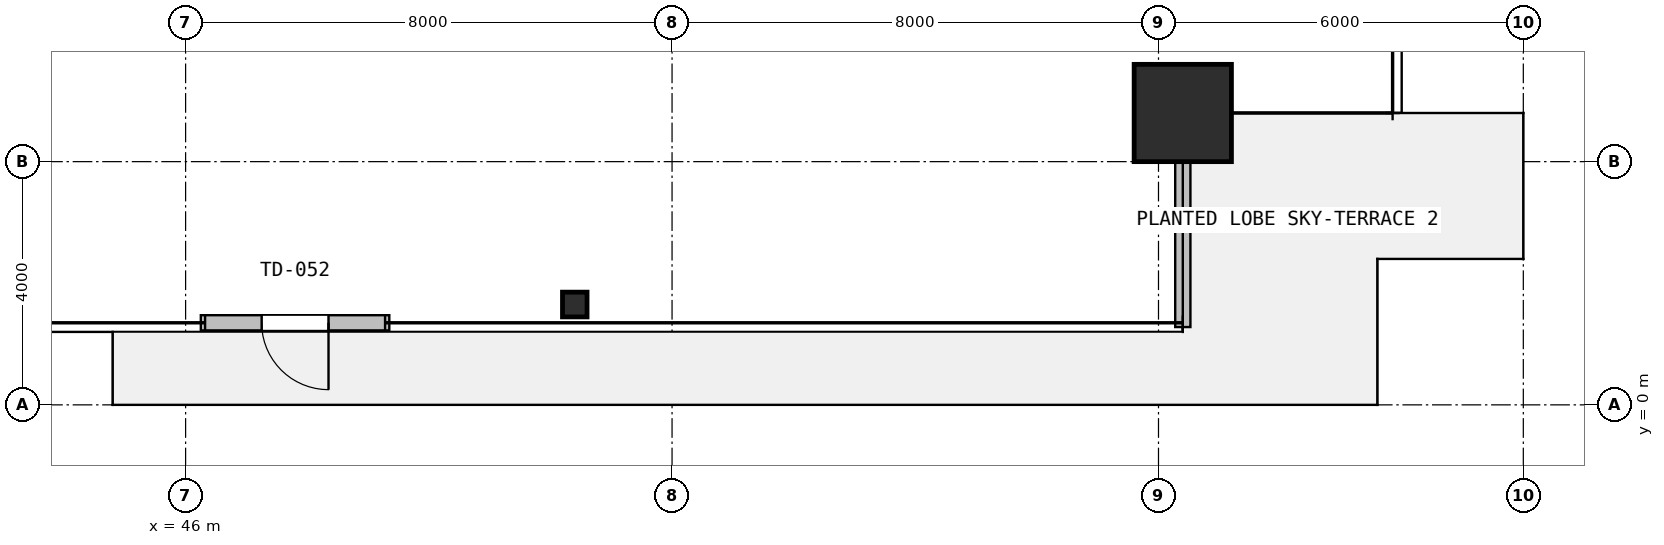
"""IFC4 building model, lengths in metres.
Left out: names, types, materials, properties, quantities, classifications, styles, units other than length and angle.
Written with IfcOpenShell. Run it as: python <this file> out.ifc"""

import sys

from ifc_helpers import new_model, si_unit, direction, frame, frame_2d, origin, origin_2d, place, context, subcontext, project, spatial, rectangle, hollow_rectangle, i_section, extrude, source, transform, mapped, element, fill, save


model = new_model("IFC4")
c1 = context("Model", 3, precision=1e-05, world=origin(), true_north=direction((0.0, 1.0)))
c2 = subcontext(c1, "Body", "Model", "MODEL_VIEW")
j1 = project(units=[si_unit("LENGTHUNIT", "METRE"), si_unit("PLANEANGLEUNIT", "RADIAN")], contexts=[c1])
p1 = place(None, origin())
s1 = spatial("IfcSite", under=j1, at=p1, CompositionType="ELEMENT")
p2 = place(p1, origin())
s2 = spatial("IfcBuilding", under=s1, at=p2, CompositionType="ELEMENT")
p3 = place(p2, frame((0.0, 0.0, 27.6)))
s3 = spatial("IfcBuildingStorey", under=s2, at=p3, CompositionType="ELEMENT", Elevation=27.6)
m1 = source(origin(), c2, "Body", "SweptSolid", [
    extrude(hollow_rectangle(XDim=1.6, YDim=1.6, WallThickness=0.06, at=origin_2d()), origin(), (0.0, 0.0, 1.0), 3.9),
])
p4 = place(p3, frame((62.4, 4.8, 0.0), z_axis=(0.0, 0.0, 1.0), x_axis=(1.0, 0.0, 0.0)))
e1 = element("IfcColumn", 1, at=p4, inside=s3, PredefinedType="COLUMN", context=c2, shape_type="MappedRepresentation", body=[
    mapped(m1, transform((0.0, 0.0, 0.0), x_axis=(1.0, 0.0, 0.0), y_axis=(0.0, 1.0, 0.0), z_axis=(0.0, 0.0, 1.0), scale=1.0)),
])
m2 = source(origin(), c2, "Body", "SweptSolid", [
    extrude(i_section(OverallWidth=0.404, OverallDepth=0.407, WebThickness=0.027, FlangeThickness=0.044, FilletRadius=0.018, at=origin_2d()), origin(), (0.0, 0.0, 1.0), 3.9),
])
p5 = place(p3, frame((52.4, 1.65, 0.0), z_axis=(0.0, 0.0, 1.0), x_axis=(1.0, 0.0, 0.0)))
e2 = element("IfcColumn", 2, at=p5, inside=s3, PredefinedType="COLUMN", context=c2, shape_type="MappedRepresentation", body=[
    mapped(m2, transform((0.0, 0.0, 0.0), x_axis=(1.0, 0.0, 0.0), y_axis=(0.0, 1.0, 0.0), z_axis=(0.0, 0.0, 1.0), scale=1.0)),
])
p6 = place(p3, frame((46.25, 1.35, 0.0), z_axis=(0.0, 0.0, 1.0), x_axis=(1.0, 0.0, 0.0)))
e3 = element("IfcWall", 3, at=p6, inside=s3, PredefinedType="SOLIDWALL", context=c2, shape_type="SweptSolid", body=[
    extrude(rectangle(XDim=3.1, YDim=0.25, at=frame_2d((1.55, 0.0))), origin(), (0.0, 0.0, 1.0), 3.63),
])
p7 = place(p6, frame((1.0, 0.0, 0.0)))
e4 = element("IfcOpeningElement", 4, at=p7, cuts=e3, PredefinedType="OPENING", context=c2, shape_type="SweptSolid", body=[
    extrude(rectangle(XDim=1.1, YDim=2.15, at=frame_2d((0.55, 1.075))), frame((0.0, 0.135, 0.0), z_axis=(0.0, -1.0, 0.0), x_axis=(1.0, 0.0, 0.0)), (0.0, 0.0, 1.0), 0.27),
])
p8 = place(p3, frame((62.4, 1.28, 0.0), z_axis=(0.0, 0.0, 1.0), x_axis=(0.0, 1.0, 0.0)))
e5 = element("IfcWall", 5, at=p8, inside=s3, PredefinedType="SOLIDWALL", context=c2, shape_type="SweptSolid", body=[
    extrude(rectangle(XDim=3.6, YDim=0.25, at=frame_2d((1.8, 0.0))), origin(), (0.0, 0.0, 1.0), 3.208),
])
m3 = source(origin(), c2, "Body", "SweptSolid", [
    extrude(rectangle(XDim=1.1, YDim=2.15, at=frame_2d((0.55, 1.075))), frame((0.0, 0.025, 0.0), z_axis=(0.0, -1.0, 0.0), x_axis=(1.0, 0.0, 0.0)), (0.0, 0.0, 1.0), 0.05),
])
p9 = place(p7, frame((1.1, 0.0, 0.0), z_axis=(0.0, 0.0, 1.0), x_axis=(-1.0, 0.0, 0.0)))
e6 = element("IfcDoor", 6, at=p9, inside=s3, OperationType="SINGLE_SWING_RIGHT", PredefinedType="DOOR", context=c2, shape_type="MappedRepresentation", body=[
    mapped(m3, transform((0.0, 0.0, 0.0), x_axis=(1.0, 0.0, 0.0), y_axis=(0.0, 1.0, 0.0), z_axis=(0.0, 0.0, 1.0), scale=1.0)),
])
fill(e4, e6)
save(model, sys.argv[1])
